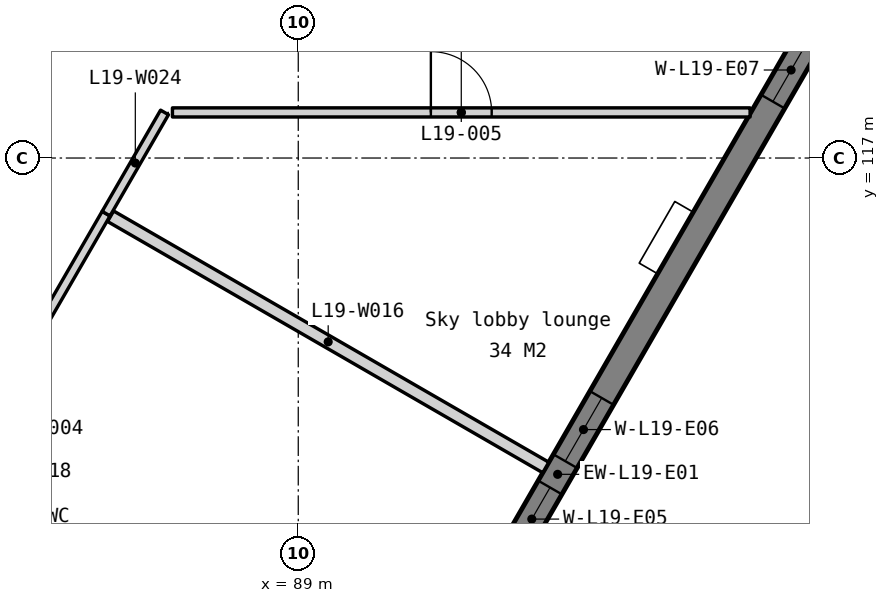
"""IFC4 building model, lengths in metres.
Left out: names, types, materials, properties, quantities, classifications, styles, units other than length and angle.
Written with IfcOpenShell. Run it as: python <this file> out.ifc"""

import sys

from ifc_helpers import new_model, si_unit, direction, frame, frame_2d, origin, place, context, subcontext, project, spatial, polyline, rectangle, outline, extrude, element, fill, save


model = new_model("IFC4")
c1 = context("Model", 3, precision=1e-05, world=origin(), true_north=direction((0.0, 1.0)))
c2 = subcontext(c1, "Body", "Model", "MODEL_VIEW")
j1 = project(units=[si_unit("LENGTHUNIT", "METRE"), si_unit("PLANEANGLEUNIT", "RADIAN")], contexts=[c1])
p1 = place(None, origin())
s1 = spatial("IfcSite", under=j1, at=p1, CompositionType="ELEMENT")
p2 = place(p1, origin())
s2 = spatial("IfcBuilding", under=s1, at=p2, CompositionType="ELEMENT")
p3 = place(p2, frame((0.0, 0.0, 81.8)))
s3 = spatial("IfcBuildingStorey", under=s2, at=p3, CompositionType="ELEMENT", Elevation=81.8)
p4 = place(p3, frame((82.605, 93.333, -0.45), z_axis=(0.0, 0.0, 1.0), x_axis=(0.500000478905, 0.866025127289, 0.0)))
e1 = element("IfcWall", 1, at=p4, inside=s3, PredefinedType="SOLIDWALL", context=c2, shape_type="SweptSolid", body=[
    extrude(outline(polyline([(42.643, 0.0), (42.643, 3.8), (0.0, 3.8), (0.0, 0.0), (42.643, 0.0)])), frame((0.0, 0.225, 0.0), z_axis=(0.0, -1.0, 0.0), x_axis=(1.0, 0.0, 0.0)), (0.0, 0.0, 1.0), 0.45),
])
p5 = place(p4, frame((2.814, 0.0, 1.35)))
e2 = element("IfcOpeningElement", 2, at=p5, cuts=e1, PredefinedType="OPENING", context=c2, shape_type="SweptSolid", body=[
    extrude(rectangle(XDim=1.2, YDim=1.5, at=frame_2d((0.6, 0.75))), frame((0.0, 0.235, 0.0), z_axis=(0.0, -1.0, 0.0), x_axis=(1.0, 0.0, 0.0)), (0.0, 0.0, 1.0), 0.47),
])
p6 = place(p4, frame((4.514, 0.0, 1.35)))
e3 = element("IfcOpeningElement", 3, at=p6, cuts=e1, PredefinedType="OPENING", context=c2, shape_type="SweptSolid", body=[
    extrude(rectangle(XDim=1.2, YDim=1.5, at=frame_2d((0.6, 0.75))), frame((0.0, 0.235, 0.0), z_axis=(0.0, -1.0, 0.0), x_axis=(1.0, 0.0, 0.0)), (0.0, 0.0, 1.0), 0.47),
])
p7 = place(p4, frame((11.343, 0.0, 1.35)))
e4 = element("IfcOpeningElement", 4, at=p7, cuts=e1, PredefinedType="OPENING", context=c2, shape_type="SweptSolid", body=[
    extrude(rectangle(XDim=1.2, YDim=1.5, at=frame_2d((0.6, 0.75))), frame((0.0, 0.235, 0.0), z_axis=(0.0, -1.0, 0.0), x_axis=(1.0, 0.0, 0.0)), (0.0, 0.0, 1.0), 0.47),
])
p8 = place(p4, frame((13.043, 0.0, 1.35)))
e5 = element("IfcOpeningElement", 5, at=p8, cuts=e1, PredefinedType="OPENING", context=c2, shape_type="SweptSolid", body=[
    extrude(rectangle(XDim=1.2, YDim=1.5, at=frame_2d((0.6, 0.75))), frame((0.0, 0.235, 0.0), z_axis=(0.0, -1.0, 0.0), x_axis=(1.0, 0.0, 0.0)), (0.0, 0.0, 1.0), 0.47),
])
p9 = place(p4, frame((19.872, 0.0, 1.35)))
e6 = element("IfcOpeningElement", 6, at=p9, cuts=e1, PredefinedType="OPENING", context=c2, shape_type="SweptSolid", body=[
    extrude(rectangle(XDim=1.2, YDim=1.5, at=frame_2d((0.6, 0.75))), frame((0.0, 0.235, 0.0), z_axis=(0.0, -1.0, 0.0), x_axis=(1.0, 0.0, 0.0)), (0.0, 0.0, 1.0), 0.47),
])
p10 = place(p4, frame((21.572, 0.0, 1.35)))
e7 = element("IfcOpeningElement", 7, at=p10, cuts=e1, PredefinedType="OPENING", context=c2, shape_type="SweptSolid", body=[
    extrude(rectangle(XDim=1.2, YDim=1.5, at=frame_2d((0.6, 0.75))), frame((0.0, 0.235, 0.0), z_axis=(0.0, -1.0, 0.0), x_axis=(1.0, 0.0, 0.0)), (0.0, 0.0, 1.0), 0.47),
])
p11 = place(p4, frame((28.4, 0.0, 1.35)))
e8 = element("IfcOpeningElement", 8, at=p11, cuts=e1, PredefinedType="OPENING", context=c2, shape_type="SweptSolid", body=[
    extrude(rectangle(XDim=1.2, YDim=1.5, at=frame_2d((0.6, 0.75))), frame((0.0, 0.235, 0.0), z_axis=(0.0, -1.0, 0.0), x_axis=(1.0, 0.0, 0.0)), (0.0, 0.0, 1.0), 0.47),
])
p12 = place(p4, frame((30.1, 0.0, 1.35)))
e9 = element("IfcOpeningElement", 9, at=p12, cuts=e1, PredefinedType="OPENING", context=c2, shape_type="SweptSolid", body=[
    extrude(rectangle(XDim=1.2, YDim=1.5, at=frame_2d((0.6, 0.75))), frame((0.0, 0.235, 0.0), z_axis=(0.0, -1.0, 0.0), x_axis=(1.0, 0.0, 0.0)), (0.0, 0.0, 1.0), 0.47),
])
p13 = place(p4, frame((36.929, 0.0, 1.35)))
e10 = element("IfcOpeningElement", 10, at=p13, cuts=e1, PredefinedType="OPENING", context=c2, shape_type="SweptSolid", body=[
    extrude(rectangle(XDim=1.2, YDim=1.5, at=frame_2d((0.6, 0.75))), frame((0.0, 0.235, 0.0), z_axis=(0.0, -1.0, 0.0), x_axis=(1.0, 0.0, 0.0)), (0.0, 0.0, 1.0), 0.47),
])
p14 = place(p4, frame((38.629, 0.0, 1.35)))
e11 = element("IfcOpeningElement", 11, at=p14, cuts=e1, PredefinedType="OPENING", context=c2, shape_type="SweptSolid", body=[
    extrude(rectangle(XDim=1.2, YDim=1.5, at=frame_2d((0.6, 0.75))), frame((0.0, 0.235, 0.0), z_axis=(0.0, -1.0, 0.0), x_axis=(1.0, 0.0, 0.0)), (0.0, 0.0, 1.0), 0.47),
])
p15 = place(p3, frame((85.913, 116.043, 0.0), z_axis=(0.0, 0.0, 1.0), x_axis=(0.866022272496, -0.500005423512, 0.0)))
e12 = element("IfcWall", 12, at=p15, inside=s3, PredefinedType="PARTITIONING", context=c2, shape_type="SweptSolid", body=[
    extrude(rectangle(XDim=8.265, YDim=0.2, at=frame_2d((4.133, 0.0))), origin(), (0.0, 0.0, 1.0), 3.35),
])
p16 = place(p3, frame((81.758, 109.015, 0.0), z_axis=(0.0, 0.0, 1.0), x_axis=(0.50001151834, 0.866018753565, 0.0)))
e13 = element("IfcWall", 13, at=p16, inside=s3, PredefinedType="PARTITIONING", context=c2, shape_type="SweptSolid", body=[
    extrude(rectangle(XDim=8.164, YDim=0.15, at=frame_2d((4.082, 0.0))), origin(), (0.0, 0.0, 1.0), 3.35),
])
p17 = place(p16, frame((3.582, 0.0, 0.0)))
e14 = element("IfcOpeningElement", 14, at=p17, cuts=e13, PredefinedType="OPENING", context=c2, shape_type="SweptSolid", body=[
    extrude(rectangle(XDim=1.0, YDim=2.1, at=frame_2d((0.5, 1.05))), frame((0.0, 0.085, 0.0), z_axis=(0.0, -1.0, 0.0), x_axis=(1.0, 0.0, 0.0)), (0.0, 0.0, 1.0), 0.17),
])
p18 = place(p3, frame((85.84, 116.085, 0.0), z_axis=(0.0, 0.0, 1.0), x_axis=(0.499909361484, 0.866077727632, 0.0)))
e15 = element("IfcWall", 15, at=p18, inside=s3, PredefinedType="PARTITIONING", context=c2, shape_type="SweptSolid", body=[
    extrude(rectangle(XDim=1.922, YDim=0.15, at=frame_2d((0.961, 0.0))), origin(), (0.0, 0.0, 1.0), 3.35),
])
p19 = place(p3, frame((86.931, 117.75, 0.0), z_axis=(0.0, 0.0, 1.0), x_axis=(1.0, 0.0, 0.0)))
e16 = element("IfcWall", 16, at=p19, inside=s3, PredefinedType="PARTITIONING", context=c2, shape_type="SweptSolid", body=[
    extrude(rectangle(XDim=9.5, YDim=0.15, at=frame_2d((4.75, 0.0))), origin(), (0.0, 0.0, 1.0), 3.35),
])
p20 = place(p19, frame((4.25, 0.0, 0.0)))
e17 = element("IfcOpeningElement", 17, at=p20, cuts=e16, PredefinedType="OPENING", context=c2, shape_type="SweptSolid", body=[
    extrude(rectangle(XDim=1.0, YDim=2.1, at=frame_2d((0.5, 1.05))), frame((0.0, 0.085, 0.0), z_axis=(0.0, -1.0, 0.0), x_axis=(1.0, 0.0, 0.0)), (0.0, 0.0, 1.0), 0.17),
])
p21 = place(p9, origin())
e18 = element("IfcWindow", 18, at=p21, inside=s3, PartitioningType="SINGLE_PANEL", PredefinedType="WINDOW", context=c2, shape_type="SweptSolid", body=[
    extrude(rectangle(XDim=1.2, YDim=1.5, at=frame_2d((0.6, 0.75))), frame((0.0, 0.03, 0.0), z_axis=(0.0, -1.0, 0.0), x_axis=(1.0, 0.0, 0.0)), (0.0, 0.0, 1.0), 0.06),
])
fill(e6, e18)
p22 = place(p10, origin())
e19 = element("IfcWindow", 19, at=p22, inside=s3, PartitioningType="SINGLE_PANEL", PredefinedType="WINDOW", context=c2, shape_type="SweptSolid", body=[
    extrude(rectangle(XDim=1.2, YDim=1.5, at=frame_2d((0.6, 0.75))), frame((0.0, 0.03, 0.0), z_axis=(0.0, -1.0, 0.0), x_axis=(1.0, 0.0, 0.0)), (0.0, 0.0, 1.0), 0.06),
])
fill(e7, e19)
p23 = place(p11, origin())
e20 = element("IfcWindow", 20, at=p23, inside=s3, PartitioningType="SINGLE_PANEL", PredefinedType="WINDOW", context=c2, shape_type="SweptSolid", body=[
    extrude(rectangle(XDim=1.2, YDim=1.5, at=frame_2d((0.6, 0.75))), frame((0.0, 0.03, 0.0), z_axis=(0.0, -1.0, 0.0), x_axis=(1.0, 0.0, 0.0)), (0.0, 0.0, 1.0), 0.06),
])
fill(e8, e20)
p24 = place(p20, origin())
e21 = element("IfcDoor", 21, at=p24, inside=s3, OperationType="SINGLE_SWING_LEFT", PredefinedType="DOOR", context=c2, shape_type="SweptSolid", body=[
    extrude(rectangle(XDim=1.0, YDim=2.1, at=frame_2d((0.5, 1.05))), frame((0.0, 0.025, 0.0), z_axis=(0.0, -1.0, 0.0), x_axis=(1.0, 0.0, 0.0)), (0.0, 0.0, 1.0), 0.05),
])
fill(e17, e21)
save(model, sys.argv[1])
